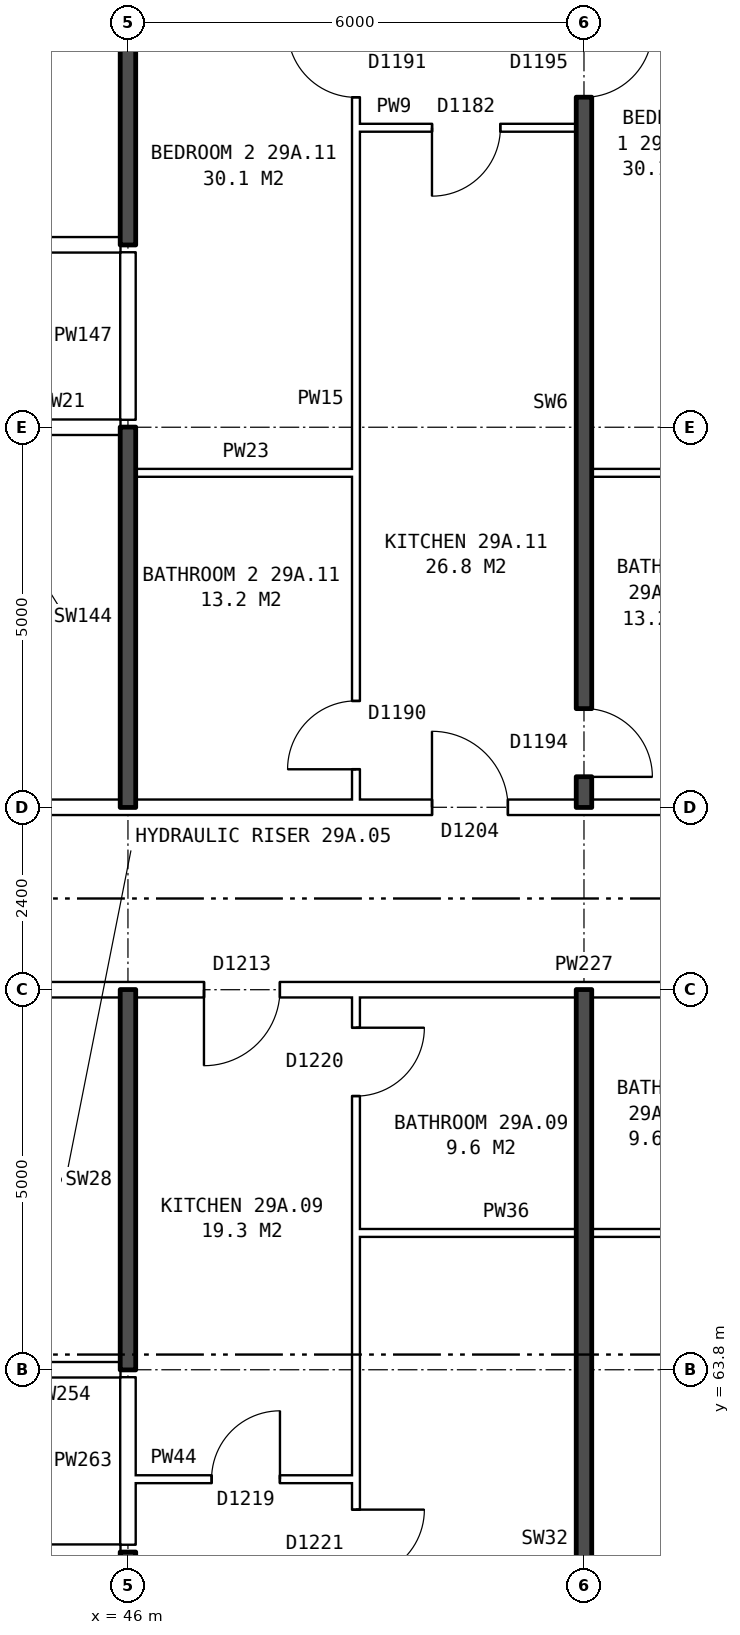
"""IFC4 building model, lengths in metres.
Left out: names, types, materials, properties, quantities, classifications, styles, units other than length and angle.
Written with IfcOpenShell. Run it as: python <this file> out.ifc"""

import sys

from ifc_helpers import new_model, si_unit, direction, frame, frame_2d, origin, place, context, subcontext, project, spatial, rectangle, extrude, element, fill, save


model = new_model("IFC4")
c1 = context("Model", 3, precision=1e-05, world=origin(), true_north=direction((0.0, 1.0)))
c2 = subcontext(c1, "Body", "Model", "MODEL_VIEW")
j1 = project(units=[si_unit("LENGTHUNIT", "METRE"), si_unit("PLANEANGLEUNIT", "RADIAN")], contexts=[c1])
p1 = place(None, origin())
s1 = spatial("IfcSite", under=j1, at=p1, CompositionType="ELEMENT")
p2 = place(p1, origin())
s2 = spatial("IfcBuilding", under=s1, at=p2, CompositionType="ELEMENT")
p3 = place(p2, frame((0.0, 0.0, 105.7)))
s3 = spatial("IfcBuildingStorey", under=s2, at=p3, CompositionType="ELEMENT", Elevation=105.7)
p4 = place(p3, frame((25.36, 61.4, 0.0), z_axis=(0.0, 0.0, 1.0), x_axis=(1.0, 0.0, 0.0)))
e1 = element("IfcWall", 1, at=p4, inside=s3, PredefinedType="PARTITIONING", context=c2, shape_type="SweptSolid", body=[
    extrude(rectangle(XDim=20.54, YDim=0.2, at=frame_2d((10.27, 0.0))), origin(), (0.0, 0.0, 1.0), 2.85),
])
p5 = place(p4, frame((15.94, 0.0, 0.0)))
e2 = element("IfcOpeningElement", 2, at=p5, cuts=e1, PredefinedType="OPENING", context=c2, shape_type="SweptSolid", body=[
    extrude(rectangle(XDim=1.0, YDim=2.1, at=frame_2d((0.5, 1.05))), frame((0.0, 0.11, 0.0), z_axis=(0.0, -1.0, 0.0), x_axis=(1.0, 0.0, 0.0)), (0.0, 0.0, 1.0), 0.22),
])
p6 = place(p4, frame((9.94, 0.0, 0.0)))
e3 = element("IfcOpeningElement", 3, at=p6, cuts=e1, PredefinedType="OPENING", context=c2, shape_type="SweptSolid", body=[
    extrude(rectangle(XDim=1.0, YDim=2.1, at=frame_2d((0.5, 1.05))), frame((0.0, 0.11, 0.0), z_axis=(0.0, -1.0, 0.0), x_axis=(1.0, 0.0, 0.0)), (0.0, 0.0, 1.0), 0.22),
])
p7 = place(p4, frame((2.62, 0.0, 0.0)))
e4 = element("IfcOpeningElement", 4, at=p7, cuts=e1, PredefinedType="OPENING", context=c2, shape_type="SweptSolid", body=[
    extrude(rectangle(XDim=1.0, YDim=2.1, at=frame_2d((0.5, 1.05))), frame((0.0, 0.11, 0.0), z_axis=(0.0, -1.0, 0.0), x_axis=(1.0, 0.0, 0.0)), (0.0, 0.0, 1.0), 0.22),
])
p8 = place(p3, frame((46.1, 62.36, 0.0), z_axis=(0.0, 0.0, 1.0), x_axis=(1.0, 0.0, 0.0)))
e5 = element("IfcWall", 5, at=p8, inside=s3, PredefinedType="PARTITIONING", context=c2, shape_type="SweptSolid", body=[
    extrude(rectangle(XDim=2.9, YDim=0.1, at=frame_2d((1.45, 0.0))), origin(), (0.0, 0.0, 1.0), 2.85),
])
p9 = place(p8, frame((1.0, 0.0, 0.0)))
e6 = element("IfcOpeningElement", 6, at=p9, cuts=e5, PredefinedType="OPENING", context=c2, shape_type="SweptSolid", body=[
    extrude(rectangle(XDim=0.9, YDim=2.1, at=frame_2d((0.45, 1.05))), frame((0.0, 0.06, 0.0), z_axis=(0.0, -1.0, 0.0), x_axis=(1.0, 0.0, 0.0)), (0.0, 0.0, 1.0), 0.12),
])
p10 = place(p3, frame((44.36, 63.8, 0.0), z_axis=(0.0, 0.0, 1.0), x_axis=(1.0, 0.0, 0.0)))
e7 = element("IfcWall", 7, at=p10, inside=s3, PredefinedType="PARTITIONING", context=c2, shape_type="SweptSolid", body=[
    extrude(rectangle(XDim=1.54, YDim=0.2, at=frame_2d((0.77, 0.0))), origin(), (0.0, 0.0, 1.0), 2.85),
])
p11 = place(p3, frame((49.0, 65.6, 0.0), z_axis=(0.0, 0.0, 1.0), x_axis=(1.0, 0.0, 0.0)))
e8 = element("IfcWall", 8, at=p11, inside=s3, PredefinedType="PARTITIONING", context=c2, shape_type="SweptSolid", body=[
    extrude(rectangle(XDim=6.0, YDim=0.1, at=frame_2d((3.0, 0.0))), origin(), (0.0, 0.0, 1.0), 2.85),
])
p12 = place(p3, frame((44.36, 68.8, 0.0), z_axis=(0.0, 0.0, 1.0), x_axis=(1.0, 0.0, 0.0)))
e9 = element("IfcWall", 9, at=p12, inside=s3, PredefinedType="PARTITIONING", context=c2, shape_type="SweptSolid", body=[
    extrude(rectangle(XDim=19.28, YDim=0.2, at=frame_2d((9.64, 0.0))), origin(), (0.0, 0.0, 1.0), 2.85),
])
p13 = place(p12, frame((17.46, 0.0, 0.0)))
e10 = element("IfcOpeningElement", 10, at=p13, cuts=e9, PredefinedType="OPENING", context=c2, shape_type="SweptSolid", body=[
    extrude(rectangle(XDim=1.0, YDim=2.1, at=frame_2d((0.5, 1.05))), frame((0.0, 0.11, 0.0), z_axis=(0.0, -1.0, 0.0), x_axis=(1.0, 0.0, 0.0)), (0.0, 0.0, 1.0), 0.22),
])
p14 = place(p12, frame((11.64, 0.0, 0.0)))
e11 = element("IfcOpeningElement", 11, at=p14, cuts=e9, PredefinedType="OPENING", context=c2, shape_type="SweptSolid", body=[
    extrude(rectangle(XDim=1.0, YDim=2.1, at=frame_2d((0.5, 1.05))), frame((0.0, 0.11, 0.0), z_axis=(0.0, -1.0, 0.0), x_axis=(1.0, 0.0, 0.0)), (0.0, 0.0, 1.0), 0.22),
])
p15 = place(p12, frame((2.64, 0.0, 0.0)))
e12 = element("IfcOpeningElement", 12, at=p15, cuts=e9, PredefinedType="OPENING", context=c2, shape_type="SweptSolid", body=[
    extrude(rectangle(XDim=1.0, YDim=2.1, at=frame_2d((0.5, 1.05))), frame((0.0, 0.11, 0.0), z_axis=(0.0, -1.0, 0.0), x_axis=(1.0, 0.0, 0.0)), (0.0, 0.0, 1.0), 0.22),
])
p16 = place(p3, frame((44.36, 71.2, 0.0), z_axis=(0.0, 0.0, 1.0), x_axis=(1.0, 0.0, 0.0)))
e13 = element("IfcWall", 13, at=p16, inside=s3, PredefinedType="PARTITIONING", context=c2, shape_type="SweptSolid", body=[
    extrude(rectangle(XDim=19.28, YDim=0.2, at=frame_2d((9.64, 0.0))), origin(), (0.0, 0.0, 1.0), 2.85),
])
p17 = place(p16, frame((14.64, 0.0, 0.0)))
e14 = element("IfcOpeningElement", 14, at=p17, cuts=e13, PredefinedType="OPENING", context=c2, shape_type="SweptSolid", body=[
    extrude(rectangle(XDim=1.0, YDim=2.1, at=frame_2d((0.5, 1.05))), frame((0.0, 0.11, 0.0), z_axis=(0.0, -1.0, 0.0), x_axis=(1.0, 0.0, 0.0)), (0.0, 0.0, 1.0), 0.22),
])
p18 = place(p16, frame((5.64, 0.0, 0.0)))
e15 = element("IfcOpeningElement", 15, at=p18, cuts=e13, PredefinedType="OPENING", context=c2, shape_type="SweptSolid", body=[
    extrude(rectangle(XDim=1.0, YDim=2.1, at=frame_2d((0.5, 1.05))), frame((0.0, 0.11, 0.0), z_axis=(0.0, -1.0, 0.0), x_axis=(1.0, 0.0, 0.0)), (0.0, 0.0, 1.0), 0.22),
])
p19 = place(p3, frame((46.1, 75.6, 0.0), z_axis=(0.0, 0.0, 1.0), x_axis=(1.0, 0.0, 0.0)))
e16 = element("IfcWall", 16, at=p19, inside=s3, PredefinedType="PARTITIONING", context=c2, shape_type="SweptSolid", body=[
    extrude(rectangle(XDim=2.9, YDim=0.1, at=frame_2d((1.45, 0.0))), origin(), (0.0, 0.0, 1.0), 2.85),
])
p20 = place(p3, frame((52.1, 75.6, 0.0), z_axis=(0.0, 0.0, 1.0), x_axis=(1.0, 0.0, 0.0)))
e17 = element("IfcWall", 17, at=p20, inside=s3, PredefinedType="PARTITIONING", context=c2, shape_type="SweptSolid", body=[
    extrude(rectangle(XDim=2.8, YDim=0.1, at=frame_2d((1.4, 0.0))), origin(), (0.0, 0.0, 1.0), 2.85),
])
p21 = place(p3, frame((44.36, 76.2, 0.0), z_axis=(0.0, 0.0, 1.0), x_axis=(1.0, 0.0, 0.0)))
e18 = element("IfcWall", 18, at=p21, inside=s3, PredefinedType="PARTITIONING", context=c2, shape_type="SweptSolid", body=[
    extrude(rectangle(XDim=1.54, YDim=0.2, at=frame_2d((0.77, 0.0))), origin(), (0.0, 0.0, 1.0), 2.85),
])
p22 = place(p3, frame((25.36, 78.6, 0.0), z_axis=(0.0, 0.0, 1.0), x_axis=(1.0, 0.0, 0.0)))
e19 = element("IfcWall", 19, at=p22, inside=s3, PredefinedType="PARTITIONING", context=c2, shape_type="SweptSolid", body=[
    extrude(rectangle(XDim=20.54, YDim=0.2, at=frame_2d((10.27, 0.0))), origin(), (0.0, 0.0, 1.0), 2.85),
])
p23 = place(p22, frame((18.09, 0.0, 0.0)))
e20 = element("IfcOpeningElement", 20, at=p23, cuts=e19, PredefinedType="OPENING", context=c2, shape_type="SweptSolid", body=[
    extrude(rectangle(XDim=1.0, YDim=2.1, at=frame_2d((0.5, 1.05))), frame((0.0, 0.11, 0.0), z_axis=(0.0, -1.0, 0.0), x_axis=(1.0, 0.0, 0.0)), (0.0, 0.0, 1.0), 0.22),
])
p24 = place(p22, frame((12.14, 0.0, 0.0)))
e21 = element("IfcOpeningElement", 21, at=p24, cuts=e19, PredefinedType="OPENING", context=c2, shape_type="SweptSolid", body=[
    extrude(rectangle(XDim=1.0, YDim=2.1, at=frame_2d((0.5, 1.05))), frame((0.0, 0.11, 0.0), z_axis=(0.0, -1.0, 0.0), x_axis=(1.0, 0.0, 0.0)), (0.0, 0.0, 1.0), 0.22),
])
p25 = place(p22, frame((6.34, 0.0, 0.0)))
e22 = element("IfcOpeningElement", 22, at=p25, cuts=e19, PredefinedType="OPENING", context=c2, shape_type="SweptSolid", body=[
    extrude(rectangle(XDim=1.0, YDim=2.1, at=frame_2d((0.5, 1.05))), frame((0.0, 0.11, 0.0), z_axis=(0.0, -1.0, 0.0), x_axis=(1.0, 0.0, 0.0)), (0.0, 0.0, 1.0), 0.22),
])
p26 = place(p3, frame((49.0, 80.14, 0.0), z_axis=(0.0, 0.0, 1.0), x_axis=(1.0, 0.0, 0.0)))
e23 = element("IfcWall", 23, at=p26, inside=s3, PredefinedType="PARTITIONING", context=c2, shape_type="SweptSolid", body=[
    extrude(rectangle(XDim=2.9, YDim=0.1, at=frame_2d((1.45, 0.0))), origin(), (0.0, 0.0, 1.0), 2.85),
])
p27 = place(p26, frame((1.0, 0.0, 0.0)))
e24 = element("IfcOpeningElement", 24, at=p27, cuts=e23, PredefinedType="OPENING", context=c2, shape_type="SweptSolid", body=[
    extrude(rectangle(XDim=0.9, YDim=2.1, at=frame_2d((0.45, 1.05))), frame((0.0, 0.06, 0.0), z_axis=(0.0, -1.0, 0.0), x_axis=(1.0, 0.0, 0.0)), (0.0, 0.0, 1.0), 0.12),
])
p28 = place(p3, frame((46.0, 54.36, 0.0), z_axis=(0.0, 0.0, 1.0), x_axis=(0.0, 1.0, 0.0)))
e25 = element("IfcWall", 25, at=p28, inside=s3, PredefinedType="SOLIDWALL", context=c2, shape_type="SweptSolid", body=[
    extrude(rectangle(XDim=7.04, YDim=0.2, at=frame_2d((3.52, 0.0))), origin(), (0.0, 0.0, 1.0), 2.85),
])
p29 = place(p3, frame((46.0, 61.5, 0.0), z_axis=(0.0, 0.0, 1.0), x_axis=(0.0, 1.0, 0.0)))
e26 = element("IfcWall", 26, at=p29, inside=s3, PredefinedType="PARTITIONING", context=c2, shape_type="SweptSolid", body=[
    extrude(rectangle(XDim=2.2, YDim=0.2, at=frame_2d((1.1, 0.0))), origin(), (0.0, 0.0, 1.0), 2.85),
])
for number, where, z_axis, x_axis in (
    (27, (46.0, 63.8, 0.0), (0.0, 0.0, 1.0), (0.0, 1.0, 0.0)),
    (28, (46.0, 71.2, 0.0), (0.0, 0.0, 1.0), (0.0, 1.0, 0.0)),
):
    element("IfcWall", number, at=place(p3, frame(where, z_axis=z_axis, x_axis=x_axis)), inside=s3, PredefinedType="SOLIDWALL", context=c2, shape_type="SweptSolid", body=[
        extrude(rectangle(XDim=5.0, YDim=0.2, at=frame_2d((2.5, 0.0))), origin(), (0.0, 0.0, 1.0), 2.85),
    ])
p30 = place(p3, frame((46.0, 76.3, 0.0), z_axis=(0.0, 0.0, 1.0), x_axis=(0.0, 1.0, 0.0)))
e29 = element("IfcWall", 29, at=p30, inside=s3, PredefinedType="PARTITIONING", context=c2, shape_type="SweptSolid", body=[
    extrude(rectangle(XDim=2.2, YDim=0.2, at=frame_2d((1.1, 0.0))), origin(), (0.0, 0.0, 1.0), 2.85),
])
p31 = place(p3, frame((46.0, 78.6, 0.0), z_axis=(0.0, 0.0, 1.0), x_axis=(0.0, 1.0, 0.0)))
e30 = element("IfcWall", 30, at=p31, inside=s3, PredefinedType="SOLIDWALL", context=c2, shape_type="SweptSolid", body=[
    extrude(rectangle(XDim=7.04, YDim=0.2, at=frame_2d((3.52, 0.0))), origin(), (0.0, 0.0, 1.0), 2.85),
])
p32 = place(p3, frame((49.0, 54.36, 0.0), z_axis=(0.0, 0.0, 1.0), x_axis=(0.0, 1.0, 0.0)))
e31 = element("IfcWall", 31, at=p32, inside=s3, PredefinedType="PARTITIONING", context=c2, shape_type="SweptSolid", body=[
    extrude(rectangle(XDim=14.34, YDim=0.1, at=frame_2d((7.17, 0.0))), origin(), (0.0, 0.0, 1.0), 2.85),
])
p33 = place(p32, frame((6.7, 0.0, 0.0)))
e32 = element("IfcOpeningElement", 32, at=p33, cuts=e31, PredefinedType="OPENING", context=c2, shape_type="SweptSolid", body=[
    extrude(rectangle(XDim=0.9, YDim=2.1, at=frame_2d((0.45, 1.05))), frame((0.0, 0.06, 0.0), z_axis=(0.0, -1.0, 0.0), x_axis=(1.0, 0.0, 0.0)), (0.0, 0.0, 1.0), 0.12),
])
p34 = place(p32, frame((13.04, 0.0, 0.0)))
e33 = element("IfcOpeningElement", 33, at=p34, cuts=e31, PredefinedType="OPENING", context=c2, shape_type="SweptSolid", body=[
    extrude(rectangle(XDim=0.9, YDim=2.1, at=frame_2d((0.45, 1.05))), frame((0.0, 0.06, 0.0), z_axis=(0.0, -1.0, 0.0), x_axis=(1.0, 0.0, 0.0)), (0.0, 0.0, 1.0), 0.12),
])
p35 = place(p3, frame((49.0, 71.3, 0.0), z_axis=(0.0, 0.0, 1.0), x_axis=(0.0, 1.0, 0.0)))
e34 = element("IfcWall", 34, at=p35, inside=s3, PredefinedType="PARTITIONING", context=c2, shape_type="SweptSolid", body=[
    extrude(rectangle(XDim=14.34, YDim=0.1, at=frame_2d((7.17, 0.0))), origin(), (0.0, 0.0, 1.0), 2.85),
])
p36 = place(p35, frame((9.24, 0.0, 0.0)))
e35 = element("IfcOpeningElement", 35, at=p36, cuts=e34, PredefinedType="OPENING", context=c2, shape_type="SweptSolid", body=[
    extrude(rectangle(XDim=0.9, YDim=2.1, at=frame_2d((0.45, 1.05))), frame((0.0, 0.06, 0.0), z_axis=(0.0, -1.0, 0.0), x_axis=(1.0, 0.0, 0.0)), (0.0, 0.0, 1.0), 0.12),
])
p37 = place(p35, frame((0.4, 0.0, 0.0)))
e36 = element("IfcOpeningElement", 36, at=p37, cuts=e34, PredefinedType="OPENING", context=c2, shape_type="SweptSolid", body=[
    extrude(rectangle(XDim=0.9, YDim=2.1, at=frame_2d((0.45, 1.05))), frame((0.0, 0.06, 0.0), z_axis=(0.0, -1.0, 0.0), x_axis=(1.0, 0.0, 0.0)), (0.0, 0.0, 1.0), 0.12),
])
p38 = place(p3, frame((52.0, 54.36, 0.0), z_axis=(0.0, 0.0, 1.0), x_axis=(0.0, 1.0, 0.0)))
e37 = element("IfcWall", 37, at=p38, inside=s3, PredefinedType="SOLIDWALL", context=c2, shape_type="SweptSolid", body=[
    extrude(rectangle(XDim=14.44, YDim=0.2, at=frame_2d((7.22, 0.0))), origin(), (0.0, 0.0, 1.0), 2.85),
])
p39 = place(p3, frame((52.0, 71.2, 0.0), z_axis=(0.0, 0.0, 1.0), x_axis=(0.0, 1.0, 0.0)))
e38 = element("IfcWall", 38, at=p39, inside=s3, PredefinedType="SOLIDWALL", context=c2, shape_type="SweptSolid", body=[
    extrude(rectangle(XDim=14.44, YDim=0.2, at=frame_2d((7.22, 0.0))), origin(), (0.0, 0.0, 1.0), 2.85),
])
p40 = place(p39, frame((9.34, 0.0, 0.0)))
e39 = element("IfcOpeningElement", 39, at=p40, cuts=e38, PredefinedType="OPENING", context=c2, shape_type="SweptSolid", body=[
    extrude(rectangle(XDim=0.9, YDim=2.1, at=frame_2d((0.45, 1.05))), frame((0.0, 0.11, 0.0), z_axis=(0.0, -1.0, 0.0), x_axis=(1.0, 0.0, 0.0)), (0.0, 0.0, 1.0), 0.22),
])
p41 = place(p39, frame((0.4, 0.0, 0.0)))
e40 = element("IfcOpeningElement", 40, at=p41, cuts=e38, PredefinedType="OPENING", context=c2, shape_type="SweptSolid", body=[
    extrude(rectangle(XDim=0.9, YDim=2.1, at=frame_2d((0.45, 1.05))), frame((0.0, 0.11, 0.0), z_axis=(0.0, -1.0, 0.0), x_axis=(1.0, 0.0, 0.0)), (0.0, 0.0, 1.0), 0.22),
])
p42 = place(p33, frame((0.9, 0.0, 0.0), z_axis=(0.0, 0.0, 1.0), x_axis=(-1.0, 0.0, 0.0)))
e41 = element("IfcDoor", 41, at=p42, inside=s3, OperationType="SINGLE_SWING_LEFT", PredefinedType="DOOR", context=c2, shape_type="SweptSolid", body=[
    extrude(rectangle(XDim=0.9, YDim=2.1, at=frame_2d((0.45, 1.05))), frame((0.0, 0.025, 0.0), z_axis=(0.0, -1.0, 0.0), x_axis=(1.0, 0.0, 0.0)), (0.0, 0.0, 1.0), 0.05),
])
fill(e32, e41)
p43 = place(p15, frame((1.0, 0.0, 0.0), z_axis=(0.0, 0.0, 1.0), x_axis=(-1.0, 0.0, 0.0)))
e42 = element("IfcDoor", 42, at=p43, inside=s3, OperationType="SINGLE_SWING_RIGHT", PredefinedType="DOOR", context=c2, shape_type="SweptSolid", body=[
    extrude(rectangle(XDim=1.0, YDim=2.1, at=frame_2d((0.5, 1.05))), frame((0.0, 0.025, 0.0), z_axis=(0.0, -1.0, 0.0), x_axis=(1.0, 0.0, 0.0)), (0.0, 0.0, 1.0), 0.05),
])
fill(e12, e42)
p44 = place(p9, origin())
e43 = element("IfcDoor", 43, at=p44, inside=s3, OperationType="SINGLE_SWING_RIGHT", PredefinedType="DOOR", context=c2, shape_type="SweptSolid", body=[
    extrude(rectangle(XDim=0.9, YDim=2.1, at=frame_2d((0.45, 1.05))), frame((0.0, 0.025, 0.0), z_axis=(0.0, -1.0, 0.0), x_axis=(1.0, 0.0, 0.0)), (0.0, 0.0, 1.0), 0.05),
])
fill(e6, e43)
p45 = place(p34, frame((0.9, 0.0, 0.0), z_axis=(0.0, 0.0, 1.0), x_axis=(-1.0, 0.0, 0.0)))
e44 = element("IfcDoor", 44, at=p45, inside=s3, OperationType="SINGLE_SWING_LEFT", PredefinedType="DOOR", context=c2, shape_type="SweptSolid", body=[
    extrude(rectangle(XDim=0.9, YDim=2.1, at=frame_2d((0.45, 1.05))), frame((0.0, 0.025, 0.0), z_axis=(0.0, -1.0, 0.0), x_axis=(1.0, 0.0, 0.0)), (0.0, 0.0, 1.0), 0.05),
])
fill(e33, e44)
p46 = place(p40, frame((0.9, 0.0, 0.0), z_axis=(0.0, 0.0, 1.0), x_axis=(-1.0, 0.0, 0.0)))
e45 = element("IfcDoor", 45, at=p46, inside=s3, OperationType="SINGLE_SWING_LEFT", PredefinedType="DOOR", context=c2, shape_type="SweptSolid", body=[
    extrude(rectangle(XDim=0.9, YDim=2.1, at=frame_2d((0.45, 1.05))), frame((0.0, 0.025, 0.0), z_axis=(0.0, -1.0, 0.0), x_axis=(1.0, 0.0, 0.0)), (0.0, 0.0, 1.0), 0.05),
])
fill(e39, e45)
p47 = place(p36, origin())
e46 = element("IfcDoor", 46, at=p47, inside=s3, OperationType="SINGLE_SWING_RIGHT", PredefinedType="DOOR", context=c2, shape_type="SweptSolid", body=[
    extrude(rectangle(XDim=0.9, YDim=2.1, at=frame_2d((0.45, 1.05))), frame((0.0, 0.025, 0.0), z_axis=(0.0, -1.0, 0.0), x_axis=(1.0, 0.0, 0.0)), (0.0, 0.0, 1.0), 0.05),
])
fill(e35, e46)
p48 = place(p18, origin())
e47 = element("IfcDoor", 47, at=p48, inside=s3, OperationType="SINGLE_SWING_LEFT", PredefinedType="DOOR", context=c2, shape_type="SweptSolid", body=[
    extrude(rectangle(XDim=1.0, YDim=2.1, at=frame_2d((0.5, 1.05))), frame((0.0, 0.025, 0.0), z_axis=(0.0, -1.0, 0.0), x_axis=(1.0, 0.0, 0.0)), (0.0, 0.0, 1.0), 0.05),
])
fill(e15, e47)
p49 = place(p27, frame((0.9, 0.0, 0.0), z_axis=(0.0, 0.0, 1.0), x_axis=(-1.0, 0.0, 0.0)))
e48 = element("IfcDoor", 48, at=p49, inside=s3, OperationType="SINGLE_SWING_RIGHT", PredefinedType="DOOR", context=c2, shape_type="SweptSolid", body=[
    extrude(rectangle(XDim=0.9, YDim=2.1, at=frame_2d((0.45, 1.05))), frame((0.0, 0.025, 0.0), z_axis=(0.0, -1.0, 0.0), x_axis=(1.0, 0.0, 0.0)), (0.0, 0.0, 1.0), 0.05),
])
fill(e24, e48)
p50 = place(p41, frame((0.9, 0.0, 0.0), z_axis=(0.0, 0.0, 1.0), x_axis=(-1.0, 0.0, 0.0)))
e49 = element("IfcDoor", 49, at=p50, inside=s3, OperationType="SINGLE_SWING_RIGHT", PredefinedType="DOOR", context=c2, shape_type="SweptSolid", body=[
    extrude(rectangle(XDim=0.9, YDim=2.1, at=frame_2d((0.45, 1.05))), frame((0.0, 0.025, 0.0), z_axis=(0.0, -1.0, 0.0), x_axis=(1.0, 0.0, 0.0)), (0.0, 0.0, 1.0), 0.05),
])
fill(e40, e49)
p51 = place(p37, origin())
e50 = element("IfcDoor", 50, at=p51, inside=s3, OperationType="SINGLE_SWING_LEFT", PredefinedType="DOOR", context=c2, shape_type="SweptSolid", body=[
    extrude(rectangle(XDim=0.9, YDim=2.1, at=frame_2d((0.45, 1.05))), frame((0.0, 0.025, 0.0), z_axis=(0.0, -1.0, 0.0), x_axis=(1.0, 0.0, 0.0)), (0.0, 0.0, 1.0), 0.05),
])
fill(e36, e50)
save(model, sys.argv[1])
